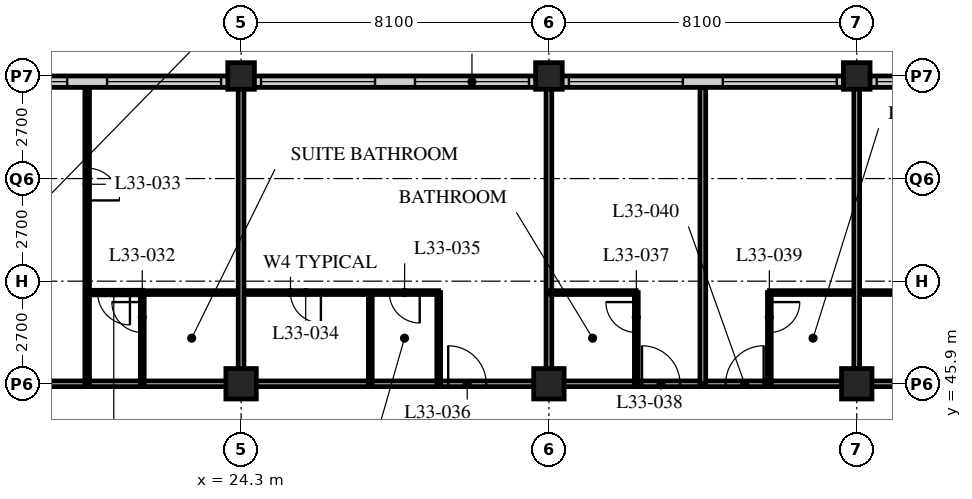
"""IFC4 building model, lengths in metres.
Left out: names, types, materials, properties, quantities, classifications, styles, units other than length and angle.
Written with IfcOpenShell. Run it as: python <this file> out.ifc"""

import sys

from ifc_helpers import new_model, si_unit, direction, frame, frame_2d, origin, origin_2d, place, context, subcontext, project, spatial, rectangle, hollow_rectangle, extrude, element, fill, save


model = new_model("IFC4")
c1 = context("Model", 3, precision=1e-05, world=origin(), true_north=direction((0.0, 1.0)))
c2 = subcontext(c1, "Body", "Model", "MODEL_VIEW")
j1 = project(units=[si_unit("LENGTHUNIT", "METRE"), si_unit("PLANEANGLEUNIT", "RADIAN")], contexts=[c1])
p1 = place(None, origin())
s1 = spatial("IfcSite", under=j1, at=p1, CompositionType="ELEMENT")
p2 = place(p1, origin())
s2 = spatial("IfcBuilding", under=s1, at=p2, CompositionType="ELEMENT")
p3 = place(p2, frame((0.0, 0.0, 130.6)))
s3 = spatial("IfcBuildingStorey", under=s2, at=p3, CompositionType="ELEMENT", Elevation=130.6)
p4 = place(p3, frame((24.3, 45.9, 0.0), z_axis=(0.0, 0.0, 1.0), x_axis=(1.0, 0.0, 0.0)))
e1 = element("IfcColumn", 1, at=p4, inside=s3, PredefinedType="COLUMN", context=c2, shape_type="SweptSolid", body=[
    extrude(hollow_rectangle(XDim=0.8, YDim=0.8, WallThickness=0.08, at=origin_2d()), origin(), (0.0, 0.0, 1.0), 3.4),
])
p5 = place(p3, frame((24.3, 54.0, 0.0), z_axis=(0.0, 0.0, 1.0), x_axis=(1.0, 0.0, 0.0)))
e2 = element("IfcColumn", 2, at=p5, inside=s3, PredefinedType="COLUMN", context=c2, shape_type="SweptSolid", body=[
    extrude(hollow_rectangle(XDim=0.7, YDim=0.7, WallThickness=0.07, at=origin_2d()), origin(), (0.0, 0.0, 1.0), 3.4),
])
p6 = place(p3, frame((32.4, 45.9, 0.0), z_axis=(0.0, 0.0, 1.0), x_axis=(1.0, 0.0, 0.0)))
e3 = element("IfcColumn", 3, at=p6, inside=s3, PredefinedType="COLUMN", context=c2, shape_type="SweptSolid", body=[
    extrude(hollow_rectangle(XDim=0.8, YDim=0.8, WallThickness=0.08, at=origin_2d()), origin(), (0.0, 0.0, 1.0), 3.4),
])
p7 = place(p3, frame((32.4, 54.0, 0.0), z_axis=(0.0, 0.0, 1.0), x_axis=(1.0, 0.0, 0.0)))
e4 = element("IfcColumn", 4, at=p7, inside=s3, PredefinedType="COLUMN", context=c2, shape_type="SweptSolid", body=[
    extrude(hollow_rectangle(XDim=0.7, YDim=0.7, WallThickness=0.07, at=origin_2d()), origin(), (0.0, 0.0, 1.0), 3.4),
])
p8 = place(p3, frame((40.5, 45.9, 0.0), z_axis=(0.0, 0.0, 1.0), x_axis=(1.0, 0.0, 0.0)))
e5 = element("IfcColumn", 5, at=p8, inside=s3, PredefinedType="COLUMN", context=c2, shape_type="SweptSolid", body=[
    extrude(hollow_rectangle(XDim=0.8, YDim=0.8, WallThickness=0.08, at=origin_2d()), origin(), (0.0, 0.0, 1.0), 3.4),
])
p9 = place(p3, frame((40.5, 54.0, 0.0), z_axis=(0.0, 0.0, 1.0), x_axis=(1.0, 0.0, 0.0)))
e6 = element("IfcColumn", 6, at=p9, inside=s3, PredefinedType="COLUMN", context=c2, shape_type="SweptSolid", body=[
    extrude(hollow_rectangle(XDim=0.7, YDim=0.7, WallThickness=0.07, at=origin_2d()), origin(), (0.0, 0.0, 1.0), 3.4),
])
p10 = place(p3, frame((48.3, 53.85, 0.0), z_axis=(0.0, 0.0, 1.0), x_axis=(-1.0, 0.0, 0.0)))
e7 = element("IfcWall", 7, at=p10, inside=s3, PredefinedType="SOLIDWALL", context=c2, shape_type="SweptSolid", body=[
    extrude(rectangle(XDim=40.2, YDim=0.3, at=frame_2d((20.1, 0.0))), origin(), (0.0, 0.0, 1.0), 3.19),
])
p11 = place(p10, frame((0.225, 0.0, 0.9)))
e8 = element("IfcOpeningElement", 8, at=p11, cuts=e7, PredefinedType="OPENING", context=c2, shape_type="SweptSolid", body=[
    extrude(rectangle(XDim=3.0, YDim=2.0, at=frame_2d((1.5, 1.0))), frame((0.0, 0.16, 0.0), z_axis=(0.0, -1.0, 0.0), x_axis=(1.0, 0.0, 0.0)), (0.0, 0.0, 1.0), 0.32),
])
p12 = place(p10, frame((4.275, 0.0, 0.9)))
e9 = element("IfcOpeningElement", 9, at=p12, cuts=e7, PredefinedType="OPENING", context=c2, shape_type="SweptSolid", body=[
    extrude(rectangle(XDim=3.0, YDim=2.0, at=frame_2d((1.5, 1.0))), frame((0.0, 0.16, 0.0), z_axis=(0.0, -1.0, 0.0), x_axis=(1.0, 0.0, 0.0)), (0.0, 0.0, 1.0), 0.32),
])
p13 = place(p10, frame((8.325, 0.0, 0.9)))
e10 = element("IfcOpeningElement", 10, at=p13, cuts=e7, PredefinedType="OPENING", context=c2, shape_type="SweptSolid", body=[
    extrude(rectangle(XDim=3.0, YDim=2.0, at=frame_2d((1.5, 1.0))), frame((0.0, 0.16, 0.0), z_axis=(0.0, -1.0, 0.0), x_axis=(1.0, 0.0, 0.0)), (0.0, 0.0, 1.0), 0.32),
])
p14 = place(p10, frame((12.375, 0.0, 0.9)))
e11 = element("IfcOpeningElement", 11, at=p14, cuts=e7, PredefinedType="OPENING", context=c2, shape_type="SweptSolid", body=[
    extrude(rectangle(XDim=3.0, YDim=2.0, at=frame_2d((1.5, 1.0))), frame((0.0, 0.16, 0.0), z_axis=(0.0, -1.0, 0.0), x_axis=(1.0, 0.0, 0.0)), (0.0, 0.0, 1.0), 0.32),
])
p15 = place(p10, frame((16.425, 0.0, 0.9)))
e12 = element("IfcOpeningElement", 12, at=p15, cuts=e7, PredefinedType="OPENING", context=c2, shape_type="SweptSolid", body=[
    extrude(rectangle(XDim=3.0, YDim=2.0, at=frame_2d((1.5, 1.0))), frame((0.0, 0.16, 0.0), z_axis=(0.0, -1.0, 0.0), x_axis=(1.0, 0.0, 0.0)), (0.0, 0.0, 1.0), 0.32),
])
p16 = place(p10, frame((20.475, 0.0, 0.9)))
e13 = element("IfcOpeningElement", 13, at=p16, cuts=e7, PredefinedType="OPENING", context=c2, shape_type="SweptSolid", body=[
    extrude(rectangle(XDim=3.0, YDim=2.0, at=frame_2d((1.5, 1.0))), frame((0.0, 0.16, 0.0), z_axis=(0.0, -1.0, 0.0), x_axis=(1.0, 0.0, 0.0)), (0.0, 0.0, 1.0), 0.32),
])
p17 = place(p10, frame((24.525, 0.0, 0.9)))
e14 = element("IfcOpeningElement", 14, at=p17, cuts=e7, PredefinedType="OPENING", context=c2, shape_type="SweptSolid", body=[
    extrude(rectangle(XDim=3.0, YDim=2.0, at=frame_2d((1.5, 1.0))), frame((0.0, 0.16, 0.0), z_axis=(0.0, -1.0, 0.0), x_axis=(1.0, 0.0, 0.0)), (0.0, 0.0, 1.0), 0.32),
])
p18 = place(p10, frame((28.575, 0.0, 0.9)))
e15 = element("IfcOpeningElement", 15, at=p18, cuts=e7, PredefinedType="OPENING", context=c2, shape_type="SweptSolid", body=[
    extrude(rectangle(XDim=3.0, YDim=2.0, at=frame_2d((1.5, 1.0))), frame((0.0, 0.16, 0.0), z_axis=(0.0, -1.0, 0.0), x_axis=(1.0, 0.0, 0.0)), (0.0, 0.0, 1.0), 0.32),
])
p19 = place(p10, frame((32.625, 0.0, 0.9)))
e16 = element("IfcOpeningElement", 16, at=p19, cuts=e7, PredefinedType="OPENING", context=c2, shape_type="SweptSolid", body=[
    extrude(rectangle(XDim=3.0, YDim=2.0, at=frame_2d((1.5, 1.0))), frame((0.0, 0.16, 0.0), z_axis=(0.0, -1.0, 0.0), x_axis=(1.0, 0.0, 0.0)), (0.0, 0.0, 1.0), 0.32),
])
p20 = place(p10, frame((36.675, 0.0, 0.9)))
e17 = element("IfcOpeningElement", 17, at=p20, cuts=e7, PredefinedType="OPENING", context=c2, shape_type="SweptSolid", body=[
    extrude(rectangle(XDim=3.0, YDim=2.0, at=frame_2d((1.5, 1.0))), frame((0.0, 0.16, 0.0), z_axis=(0.0, -1.0, 0.0), x_axis=(1.0, 0.0, 0.0)), (0.0, 0.0, 1.0), 0.32),
])
p21 = place(p3, frame((8.1, 45.9, 0.0), z_axis=(0.0, 0.0, 1.0), x_axis=(1.0, 0.0, 0.0)))
e18 = element("IfcWall", 18, at=p21, inside=s3, PredefinedType="PARTITIONING", context=c2, shape_type="SweptSolid", body=[
    extrude(rectangle(XDim=40.5, YDim=0.15, at=frame_2d((20.25, 0.0))), origin(), (0.0, 0.0, 1.0), 2.578),
])
p22 = place(p21, frame((9.625, 0.0, 0.0)))
e19 = element("IfcOpeningElement", 19, at=p22, cuts=e18, PredefinedType="OPENING", context=c2, shape_type="SweptSolid", body=[
    extrude(rectangle(XDim=1.0, YDim=2.1, at=frame_2d((0.5, 1.05))), frame((0.0, 0.085, 0.0), z_axis=(0.0, -1.0, 0.0), x_axis=(1.0, 0.0, 0.0)), (0.0, 0.0, 1.0), 0.17),
])
p23 = place(p21, frame((21.65, 0.0, 0.0)))
e20 = element("IfcOpeningElement", 20, at=p23, cuts=e18, PredefinedType="OPENING", context=c2, shape_type="SweptSolid", body=[
    extrude(rectangle(XDim=1.0, YDim=2.1, at=frame_2d((0.5, 1.05))), frame((0.0, 0.085, 0.0), z_axis=(0.0, -1.0, 0.0), x_axis=(1.0, 0.0, 0.0)), (0.0, 0.0, 1.0), 0.17),
])
p24 = place(p21, frame((26.75, 0.0, 0.0)))
e21 = element("IfcOpeningElement", 21, at=p24, cuts=e18, PredefinedType="OPENING", context=c2, shape_type="SweptSolid", body=[
    extrude(rectangle(XDim=1.0, YDim=2.1, at=frame_2d((0.5, 1.05))), frame((0.0, 0.085, 0.0), z_axis=(0.0, -1.0, 0.0), x_axis=(1.0, 0.0, 0.0)), (0.0, 0.0, 1.0), 0.17),
])
p25 = place(p21, frame((28.95, 0.0, 0.0)))
e22 = element("IfcOpeningElement", 22, at=p25, cuts=e18, PredefinedType="OPENING", context=c2, shape_type="SweptSolid", body=[
    extrude(rectangle(XDim=1.0, YDim=2.1, at=frame_2d((0.5, 1.05))), frame((0.0, 0.085, 0.0), z_axis=(0.0, -1.0, 0.0), x_axis=(1.0, 0.0, 0.0)), (0.0, 0.0, 1.0), 0.17),
])
p26 = place(p21, frame((34.85, 0.0, 0.0)))
e23 = element("IfcOpeningElement", 23, at=p26, cuts=e18, PredefinedType="OPENING", context=c2, shape_type="SweptSolid", body=[
    extrude(rectangle(XDim=1.0, YDim=2.1, at=frame_2d((0.5, 1.05))), frame((0.0, 0.085, 0.0), z_axis=(0.0, -1.0, 0.0), x_axis=(1.0, 0.0, 0.0)), (0.0, 0.0, 1.0), 0.17),
])
p27 = place(p21, frame((36.875, 0.0, 0.0)))
e24 = element("IfcOpeningElement", 24, at=p27, cuts=e18, PredefinedType="OPENING", context=c2, shape_type="SweptSolid", body=[
    extrude(rectangle(XDim=1.0, YDim=2.1, at=frame_2d((0.5, 1.05))), frame((0.0, 0.085, 0.0), z_axis=(0.0, -1.0, 0.0), x_axis=(1.0, 0.0, 0.0)), (0.0, 0.0, 1.0), 0.17),
])
p28 = place(p21, frame((2.625, 0.0, 0.0)))
e25 = element("IfcOpeningElement", 25, at=p28, cuts=e18, PredefinedType="OPENING", context=c2, shape_type="SweptSolid", body=[
    extrude(rectangle(XDim=1.0, YDim=2.1, at=frame_2d((0.5, 1.05))), frame((0.0, 0.085, 0.0), z_axis=(0.0, -1.0, 0.0), x_axis=(1.0, 0.0, 0.0)), (0.0, 0.0, 1.0), 0.17),
])
p29 = place(p3, frame((21.7, 48.3, 0.0), z_axis=(0.0, 0.0, 1.0), x_axis=(1.0, 0.0, 0.0)))
e26 = element("IfcWall", 26, at=p29, inside=s3, PredefinedType="PARTITIONING", context=c2, shape_type="SweptSolid", body=[
    extrude(rectangle(XDim=7.8, YDim=0.1, at=frame_2d((3.9, 0.0))), origin(), (0.0, 0.0, 1.0), 3.19),
])
p30 = place(p29, frame((3.9, 0.0, 0.0)))
e27 = element("IfcOpeningElement", 27, at=p30, cuts=e26, PredefinedType="OPENING", context=c2, shape_type="SweptSolid", body=[
    extrude(rectangle(XDim=0.8, YDim=2.1, at=frame_2d((0.4, 1.05))), frame((0.0, 0.06, 0.0), z_axis=(0.0, -1.0, 0.0), x_axis=(1.0, 0.0, 0.0)), (0.0, 0.0, 1.0), 0.12),
])
p31 = place(p29, frame((6.5, 0.0, 0.0)))
e28 = element("IfcOpeningElement", 28, at=p31, cuts=e26, PredefinedType="OPENING", context=c2, shape_type="SweptSolid", body=[
    extrude(rectangle(XDim=0.8, YDim=2.1, at=frame_2d((0.4, 1.05))), frame((0.0, 0.06, 0.0), z_axis=(0.0, -1.0, 0.0), x_axis=(1.0, 0.0, 0.0)), (0.0, 0.0, 1.0), 0.12),
])
p32 = place(p3, frame((21.7, 45.9, 0.0), z_axis=(0.0, 0.0, 1.0), x_axis=(0.0, 1.0, 0.0)))
e29 = element("IfcWall", 29, at=p32, inside=s3, PredefinedType="PARTITIONING", context=c2, shape_type="SweptSolid", body=[
    extrude(rectangle(XDim=2.4, YDim=0.1, at=frame_2d((1.2, 0.0))), origin(), (0.0, 0.0, 1.0), 3.19),
])
p33 = place(p32, frame((1.35, 0.0, 0.0)))
e30 = element("IfcOpeningElement", 30, at=p33, cuts=e29, PredefinedType="OPENING", context=c2, shape_type="SweptSolid", body=[
    extrude(rectangle(XDim=0.8, YDim=2.1, at=frame_2d((0.4, 1.05))), frame((0.0, 0.06, 0.0), z_axis=(0.0, -1.0, 0.0), x_axis=(1.0, 0.0, 0.0)), (0.0, 0.0, 1.0), 0.12),
])
p34 = place(p3, frame((20.25, 45.9, 0.0), z_axis=(0.0, 0.0, 1.0), x_axis=(0.0, 1.0, 0.0)))
e31 = element("IfcWall", 31, at=p34, inside=s3, PredefinedType="PARTITIONING", context=c2, shape_type="SweptSolid", body=[
    extrude(rectangle(XDim=7.8, YDim=0.12, at=frame_2d((3.9, 0.0))), origin(), (0.0, 0.0, 1.0), 3.19),
])
p35 = place(p34, frame((4.825, 0.0, 0.0)))
e32 = element("IfcOpeningElement", 32, at=p35, cuts=e31, PredefinedType="OPENING", context=c2, shape_type="SweptSolid", body=[
    extrude(rectangle(XDim=0.85, YDim=2.1, at=frame_2d((0.425, 1.05))), frame((0.0, 0.07, 0.0), z_axis=(0.0, -1.0, 0.0), x_axis=(1.0, 0.0, 0.0)), (0.0, 0.0, 1.0), 0.14),
])
p36 = place(p3, frame((24.3, 45.9, 0.0), z_axis=(0.0, 0.0, 1.0), x_axis=(0.0, 1.0, 0.0)))
e33 = element("IfcWall", 33, at=p36, inside=s3, PredefinedType="PARTITIONING", context=c2, shape_type="SweptSolid", body=[
    extrude(rectangle(XDim=7.8, YDim=0.15, at=frame_2d((3.9, 0.0))), origin(), (0.0, 0.0, 1.0), 2.578),
])
for number, where, z_axis, x_axis in (
    (34, (27.7, 45.9, 0.0), (0.0, 0.0, 1.0), (0.0, 1.0, 0.0)),
    (35, (29.5, 45.9, 0.0), (0.0, 0.0, 1.0), (0.0, 1.0, 0.0)),
):
    element("IfcWall", number, at=place(p3, frame(where, z_axis=z_axis, x_axis=x_axis)), inside=s3, PredefinedType="PARTITIONING", context=c2, shape_type="SweptSolid", body=[
        extrude(rectangle(XDim=2.4, YDim=0.1, at=frame_2d((1.2, 0.0))), origin(), (0.0, 0.0, 1.0), 3.19),
    ])
p37 = place(p3, frame((32.4, 45.9, 0.0), z_axis=(0.0, 0.0, 1.0), x_axis=(0.0, 1.0, 0.0)))
e36 = element("IfcWall", 36, at=p37, inside=s3, PredefinedType="PARTITIONING", context=c2, shape_type="SweptSolid", body=[
    extrude(rectangle(XDim=7.8, YDim=0.15, at=frame_2d((3.9, 0.0))), origin(), (0.0, 0.0, 1.0), 2.578),
])
p38 = place(p3, frame((32.4, 48.3, 0.0), z_axis=(0.0, 0.0, 1.0), x_axis=(1.0, 0.0, 0.0)))
e37 = element("IfcWall", 37, at=p38, inside=s3, PredefinedType="PARTITIONING", context=c2, shape_type="SweptSolid", body=[
    extrude(rectangle(XDim=2.3, YDim=0.1, at=frame_2d((1.15, 0.0))), origin(), (0.0, 0.0, 1.0), 3.19),
])
p39 = place(p3, frame((34.7, 45.9, 0.0), z_axis=(0.0, 0.0, 1.0), x_axis=(0.0, 1.0, 0.0)))
e38 = element("IfcWall", 38, at=p39, inside=s3, PredefinedType="PARTITIONING", context=c2, shape_type="SweptSolid", body=[
    extrude(rectangle(XDim=2.4, YDim=0.1, at=frame_2d((1.2, 0.0))), origin(), (0.0, 0.0, 1.0), 3.19),
])
p40 = place(p39, frame((1.35, 0.0, 0.0)))
e39 = element("IfcOpeningElement", 39, at=p40, cuts=e38, PredefinedType="OPENING", context=c2, shape_type="SweptSolid", body=[
    extrude(rectangle(XDim=0.8, YDim=2.1, at=frame_2d((0.4, 1.05))), frame((0.0, 0.06, 0.0), z_axis=(0.0, -1.0, 0.0), x_axis=(1.0, 0.0, 0.0)), (0.0, 0.0, 1.0), 0.12),
])
p41 = place(p3, frame((36.45, 45.9, 0.0), z_axis=(0.0, 0.0, 1.0), x_axis=(0.0, 1.0, 0.0)))
e40 = element("IfcWall", 40, at=p41, inside=s3, PredefinedType="PARTITIONING", context=c2, shape_type="SweptSolid", body=[
    extrude(rectangle(XDim=7.8, YDim=0.15, at=frame_2d((3.9, 0.0))), origin(), (0.0, 0.0, 1.0), 3.19),
])
p42 = place(p3, frame((38.2, 48.3, 0.0), z_axis=(0.0, 0.0, 1.0), x_axis=(1.0, 0.0, 0.0)))
e41 = element("IfcWall", 41, at=p42, inside=s3, PredefinedType="PARTITIONING", context=c2, shape_type="SweptSolid", body=[
    extrude(rectangle(XDim=4.6, YDim=0.1, at=frame_2d((2.3, 0.0))), origin(), (0.0, 0.0, 1.0), 3.19),
])
p43 = place(p3, frame((38.2, 45.9, 0.0), z_axis=(0.0, 0.0, 1.0), x_axis=(0.0, 1.0, 0.0)))
e42 = element("IfcWall", 42, at=p43, inside=s3, PredefinedType="PARTITIONING", context=c2, shape_type="SweptSolid", body=[
    extrude(rectangle(XDim=2.4, YDim=0.1, at=frame_2d((1.2, 0.0))), origin(), (0.0, 0.0, 1.0), 3.19),
])
p44 = place(p43, frame((1.35, 0.0, 0.0)))
e43 = element("IfcOpeningElement", 43, at=p44, cuts=e42, PredefinedType="OPENING", context=c2, shape_type="SweptSolid", body=[
    extrude(rectangle(XDim=0.8, YDim=2.1, at=frame_2d((0.4, 1.05))), frame((0.0, 0.06, 0.0), z_axis=(0.0, -1.0, 0.0), x_axis=(1.0, 0.0, 0.0)), (0.0, 0.0, 1.0), 0.12),
])
p45 = place(p3, frame((40.5, 45.9, 0.0), z_axis=(0.0, 0.0, 1.0), x_axis=(0.0, 1.0, 0.0)))
e44 = element("IfcWall", 44, at=p45, inside=s3, PredefinedType="PARTITIONING", context=c2, shape_type="SweptSolid", body=[
    extrude(rectangle(XDim=7.8, YDim=0.15, at=frame_2d((3.9, 0.0))), origin(), (0.0, 0.0, 1.0), 2.578),
])
p46 = place(p3, frame((20.25, 48.3, 0.0), z_axis=(0.0, 0.0, 1.0), x_axis=(1.0, 0.0, 0.0)))
e45 = element("IfcWall", 45, at=p46, inside=s3, PredefinedType="PARTITIONING", context=c2, shape_type="SweptSolid", body=[
    extrude(rectangle(XDim=1.46, YDim=0.12, at=frame_2d((0.73, 0.0))), origin(), (0.0, 0.0, 1.0), 3.19),
])
p47 = place(p46, frame((0.275, 0.0, 0.0)))
e46 = element("IfcOpeningElement", 46, at=p47, cuts=e45, PredefinedType="OPENING", context=c2, shape_type="SweptSolid", body=[
    extrude(rectangle(XDim=0.85, YDim=2.1, at=frame_2d((0.425, 1.05))), frame((0.0, 0.07, 0.0), z_axis=(0.0, -1.0, 0.0), x_axis=(1.0, 0.0, 0.0)), (0.0, 0.0, 1.0), 0.14),
])
p48 = place(p12, origin())
e47 = element("IfcWindow", 47, at=p48, inside=s3, PartitioningType="SINGLE_PANEL", PredefinedType="WINDOW", context=c2, shape_type="SweptSolid", body=[
    extrude(rectangle(XDim=3.0, YDim=2.0, at=frame_2d((1.5, 1.0))), frame((0.0, 0.03, 0.0), z_axis=(0.0, -1.0, 0.0), x_axis=(1.0, 0.0, 0.0)), (0.0, 0.0, 1.0), 0.06),
])
fill(e9, e47)
p49 = place(p13, origin())
e48 = element("IfcWindow", 48, at=p49, inside=s3, PartitioningType="SINGLE_PANEL", PredefinedType="WINDOW", context=c2, shape_type="SweptSolid", body=[
    extrude(rectangle(XDim=3.0, YDim=2.0, at=frame_2d((1.5, 1.0))), frame((0.0, 0.03, 0.0), z_axis=(0.0, -1.0, 0.0), x_axis=(1.0, 0.0, 0.0)), (0.0, 0.0, 1.0), 0.06),
])
fill(e10, e48)
p50 = place(p14, origin())
e49 = element("IfcWindow", 49, at=p50, inside=s3, PartitioningType="SINGLE_PANEL", PredefinedType="WINDOW", context=c2, shape_type="SweptSolid", body=[
    extrude(rectangle(XDim=3.0, YDim=2.0, at=frame_2d((1.5, 1.0))), frame((0.0, 0.03, 0.0), z_axis=(0.0, -1.0, 0.0), x_axis=(1.0, 0.0, 0.0)), (0.0, 0.0, 1.0), 0.06),
])
fill(e11, e49)
p51 = place(p15, origin())
e50 = element("IfcWindow", 50, at=p51, inside=s3, PartitioningType="SINGLE_PANEL", PredefinedType="WINDOW", context=c2, shape_type="SweptSolid", body=[
    extrude(rectangle(XDim=3.0, YDim=2.0, at=frame_2d((1.5, 1.0))), frame((0.0, 0.03, 0.0), z_axis=(0.0, -1.0, 0.0), x_axis=(1.0, 0.0, 0.0)), (0.0, 0.0, 1.0), 0.06),
])
fill(e12, e50)
p52 = place(p16, origin())
e51 = element("IfcWindow", 51, at=p52, inside=s3, PartitioningType="SINGLE_PANEL", PredefinedType="WINDOW", context=c2, shape_type="SweptSolid", body=[
    extrude(rectangle(XDim=3.0, YDim=2.0, at=frame_2d((1.5, 1.0))), frame((0.0, 0.03, 0.0), z_axis=(0.0, -1.0, 0.0), x_axis=(1.0, 0.0, 0.0)), (0.0, 0.0, 1.0), 0.06),
])
fill(e13, e51)
p53 = place(p17, origin())
e52 = element("IfcWindow", 52, at=p53, inside=s3, PartitioningType="SINGLE_PANEL", PredefinedType="WINDOW", context=c2, shape_type="SweptSolid", body=[
    extrude(rectangle(XDim=3.0, YDim=2.0, at=frame_2d((1.5, 1.0))), frame((0.0, 0.03, 0.0), z_axis=(0.0, -1.0, 0.0), x_axis=(1.0, 0.0, 0.0)), (0.0, 0.0, 1.0), 0.06),
])
fill(e14, e52)
p54 = place(p18, origin())
e53 = element("IfcWindow", 53, at=p54, inside=s3, PartitioningType="SINGLE_PANEL", PredefinedType="WINDOW", context=c2, shape_type="SweptSolid", body=[
    extrude(rectangle(XDim=3.0, YDim=2.0, at=frame_2d((1.5, 1.0))), frame((0.0, 0.03, 0.0), z_axis=(0.0, -1.0, 0.0), x_axis=(1.0, 0.0, 0.0)), (0.0, 0.0, 1.0), 0.06),
])
fill(e15, e53)
p55 = place(p33, origin())
e54 = element("IfcDoor", 54, at=p55, inside=s3, OperationType="SINGLE_SWING_RIGHT", PredefinedType="DOOR", context=c2, shape_type="SweptSolid", body=[
    extrude(rectangle(XDim=0.8, YDim=2.1, at=frame_2d((0.4, 1.05))), frame((0.0, 0.025, 0.0), z_axis=(0.0, -1.0, 0.0), x_axis=(1.0, 0.0, 0.0)), (0.0, 0.0, 1.0), 0.05),
])
fill(e30, e54)
p56 = place(p35, origin())
e55 = element("IfcDoor", 55, at=p56, inside=s3, OperationType="SINGLE_SWING_RIGHT", PredefinedType="DOOR", context=c2, shape_type="SweptSolid", body=[
    extrude(rectangle(XDim=0.85, YDim=2.1, at=frame_2d((0.425, 1.05))), frame((0.0, 0.025, 0.0), z_axis=(0.0, -1.0, 0.0), x_axis=(1.0, 0.0, 0.0)), (0.0, 0.0, 1.0), 0.05),
])
fill(e32, e55)
p57 = place(p30, origin())
e56 = element("IfcDoor", 56, at=p57, inside=s3, OperationType="SINGLE_SWING_LEFT", PredefinedType="DOOR", context=c2, shape_type="SweptSolid", body=[
    extrude(rectangle(XDim=0.8, YDim=2.1, at=frame_2d((0.4, 1.05))), frame((0.0, 0.025, 0.0), z_axis=(0.0, -1.0, 0.0), x_axis=(1.0, 0.0, 0.0)), (0.0, 0.0, 1.0), 0.05),
])
fill(e27, e56)
p58 = place(p31, origin())
e57 = element("IfcDoor", 57, at=p58, inside=s3, OperationType="SINGLE_SWING_LEFT", PredefinedType="DOOR", context=c2, shape_type="SweptSolid", body=[
    extrude(rectangle(XDim=0.8, YDim=2.1, at=frame_2d((0.4, 1.05))), frame((0.0, 0.025, 0.0), z_axis=(0.0, -1.0, 0.0), x_axis=(1.0, 0.0, 0.0)), (0.0, 0.0, 1.0), 0.05),
])
fill(e28, e57)
p59 = place(p23, origin())
e58 = element("IfcDoor", 58, at=p59, inside=s3, OperationType="SINGLE_SWING_LEFT", PredefinedType="DOOR", context=c2, shape_type="SweptSolid", body=[
    extrude(rectangle(XDim=1.0, YDim=2.1, at=frame_2d((0.5, 1.05))), frame((0.0, 0.025, 0.0), z_axis=(0.0, -1.0, 0.0), x_axis=(1.0, 0.0, 0.0)), (0.0, 0.0, 1.0), 0.05),
])
fill(e20, e58)
p60 = place(p40, origin())
e59 = element("IfcDoor", 59, at=p60, inside=s3, OperationType="SINGLE_SWING_RIGHT", PredefinedType="DOOR", context=c2, shape_type="SweptSolid", body=[
    extrude(rectangle(XDim=0.8, YDim=2.1, at=frame_2d((0.4, 1.05))), frame((0.0, 0.025, 0.0), z_axis=(0.0, -1.0, 0.0), x_axis=(1.0, 0.0, 0.0)), (0.0, 0.0, 1.0), 0.05),
])
fill(e39, e59)
p61 = place(p24, origin())
e60 = element("IfcDoor", 60, at=p61, inside=s3, OperationType="SINGLE_SWING_LEFT", PredefinedType="DOOR", context=c2, shape_type="SweptSolid", body=[
    extrude(rectangle(XDim=1.0, YDim=2.1, at=frame_2d((0.5, 1.05))), frame((0.0, 0.025, 0.0), z_axis=(0.0, -1.0, 0.0), x_axis=(1.0, 0.0, 0.0)), (0.0, 0.0, 1.0), 0.05),
])
fill(e21, e60)
p62 = place(p44, origin())
e61 = element("IfcDoor", 61, at=p62, inside=s3, OperationType="SINGLE_SWING_LEFT", PredefinedType="DOOR", context=c2, shape_type="SweptSolid", body=[
    extrude(rectangle(XDim=0.8, YDim=2.1, at=frame_2d((0.4, 1.05))), frame((0.0, 0.025, 0.0), z_axis=(0.0, -1.0, 0.0), x_axis=(1.0, 0.0, 0.0)), (0.0, 0.0, 1.0), 0.05),
])
fill(e43, e61)
p63 = place(p25, origin())
e62 = element("IfcDoor", 62, at=p63, inside=s3, OperationType="SINGLE_SWING_RIGHT", PredefinedType="DOOR", context=c2, shape_type="SweptSolid", body=[
    extrude(rectangle(XDim=1.0, YDim=2.1, at=frame_2d((0.5, 1.05))), frame((0.0, 0.025, 0.0), z_axis=(0.0, -1.0, 0.0), x_axis=(1.0, 0.0, 0.0)), (0.0, 0.0, 1.0), 0.05),
])
fill(e22, e62)
p64 = place(p47, origin())
e63 = element("IfcDoor", 63, at=p64, inside=s3, OperationType="SINGLE_SWING_LEFT", PredefinedType="DOOR", context=c2, shape_type="SweptSolid", body=[
    extrude(rectangle(XDim=0.85, YDim=2.1, at=frame_2d((0.425, 1.05))), frame((0.0, 0.025, 0.0), z_axis=(0.0, -1.0, 0.0), x_axis=(1.0, 0.0, 0.0)), (0.0, 0.0, 1.0), 0.05),
])
fill(e46, e63)
save(model, sys.argv[1])
